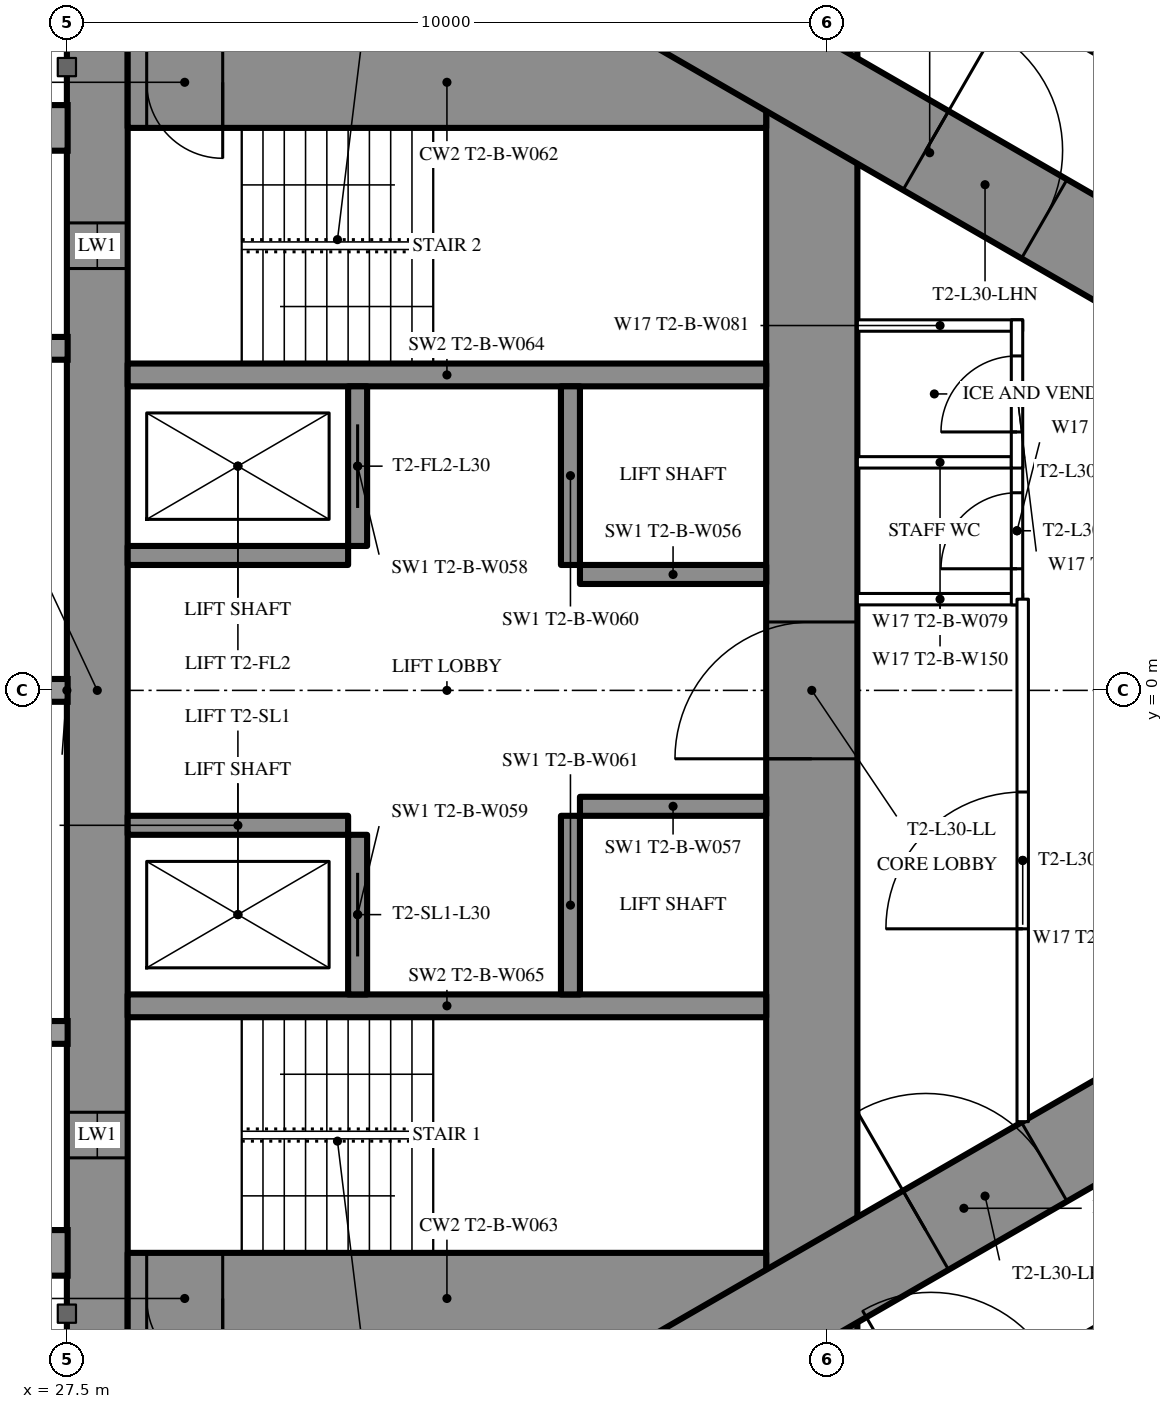
"""IFC4 building model, lengths in metres.
Left out: names, types, materials, properties, quantities, classifications, styles, units other than length and angle.
Written with IfcOpenShell. Run it as: python <this file> out.ifc"""

import sys

from ifc_helpers import new_model, si_unit, direction, frame, frame_2d, origin, place, context, subcontext, project, spatial, rectangle, extrude, element, fill, save


model = new_model("IFC4")
c1 = context("Model", 3, precision=1e-05, world=origin(), true_north=direction((0.0, 1.0)))
c2 = subcontext(c1, "Body", "Model", "MODEL_VIEW")
j1 = project(units=[si_unit("LENGTHUNIT", "METRE"), si_unit("PLANEANGLEUNIT", "RADIAN")], contexts=[c1])
p1 = place(None, origin())
s1 = spatial("IfcSite", under=j1, at=p1, CompositionType="ELEMENT")
p2 = place(p1, origin())
s2 = spatial("IfcBuilding", under=s1, at=p2, CompositionType="ELEMENT")
p3 = place(p2, frame((0.0, 0.0, 115.1)))
s3 = spatial("IfcBuildingStorey", under=s2, at=p3, CompositionType="ELEMENT", Elevation=115.1)
p4 = place(p3, frame((27.9, -8.6, 0.0), z_axis=(0.0, 0.0, 1.0), x_axis=(0.0, 1.0, 0.0)))
e1 = element("IfcWall", 1, at=p4, inside=s3, PredefinedType="SHEAR", context=c2, shape_type="SweptSolid", body=[
    extrude(rectangle(XDim=17.2, YDim=0.8, at=frame_2d((8.6, 0.0))), origin(), (0.0, 0.0, 1.0), 3.5),
])
p5 = place(p4, frame((2.45, 0.0, 0.6)))
e2 = element("IfcOpeningElement", 2, at=p5, cuts=e1, PredefinedType="OPENING", context=c2, shape_type="SweptSolid", body=[
    extrude(rectangle(XDim=0.6, YDim=2.1, at=frame_2d((0.3, 1.05))), frame((0.0, 0.41, 0.0), z_axis=(0.0, -1.0, 0.0), x_axis=(1.0, 0.0, 0.0)), (0.0, 0.0, 1.0), 0.82),
])
p6 = place(p4, frame((14.15, 0.0, 0.6)))
e3 = element("IfcOpeningElement", 3, at=p6, cuts=e1, PredefinedType="OPENING", context=c2, shape_type="SweptSolid", body=[
    extrude(rectangle(XDim=0.6, YDim=2.1, at=frame_2d((0.3, 1.05))), frame((0.0, 0.41, 0.0), z_axis=(0.0, -1.0, 0.0), x_axis=(1.0, 0.0, 0.0)), (0.0, 0.0, 1.0), 0.82),
])
p7 = place(p3, frame((37.3, -8.6, 0.0), z_axis=(0.0, 0.0, 1.0), x_axis=(0.0, 1.0, 0.0)))
e4 = element("IfcWall", 4, at=p7, inside=s3, PredefinedType="SHEAR", context=c2, shape_type="SweptSolid", body=[
    extrude(rectangle(XDim=17.2, YDim=1.2, at=frame_2d((8.6, 0.0))), origin(), (0.0, 0.0, 1.0), 3.5),
])
p8 = place(p7, frame((7.7, 0.0, 0.0)))
e5 = element("IfcOpeningElement", 5, at=p8, cuts=e4, PredefinedType="OPENING", context=c2, shape_type="SweptSolid", body=[
    extrude(rectangle(XDim=1.8, YDim=2.2, at=frame_2d((0.9, 1.1))), frame((0.0, 0.61, 0.0), z_axis=(0.0, -1.0, 0.0), x_axis=(1.0, 0.0, 0.0)), (0.0, 0.0, 1.0), 1.22),
])
p9 = place(p3, frame((28.3, -8.0, 0.0), z_axis=(0.0, 0.0, 1.0), x_axis=(1.0, 0.0, 0.0)))
e6 = element("IfcWall", 6, at=p9, inside=s3, PredefinedType="SHEAR", context=c2, shape_type="SweptSolid", body=[
    extrude(rectangle(XDim=8.4, YDim=1.2, at=frame_2d((4.2, 0.0))), origin(), (0.0, 0.0, 1.0), 3.5),
])
p10 = place(p9, frame((0.25, 0.0, 0.0)))
e7 = element("IfcOpeningElement", 7, at=p10, cuts=e6, PredefinedType="OPENING", context=c2, shape_type="SweptSolid", body=[
    extrude(rectangle(XDim=1.0, YDim=2.2, at=frame_2d((0.5, 1.1))), frame((0.0, 0.61, 0.0), z_axis=(0.0, -1.0, 0.0), x_axis=(1.0, 0.0, 0.0)), (0.0, 0.0, 1.0), 1.22),
])
p11 = place(p3, frame((28.3, 8.0, 0.0), z_axis=(0.0, 0.0, 1.0), x_axis=(1.0, 0.0, 0.0)))
e8 = element("IfcWall", 8, at=p11, inside=s3, PredefinedType="SHEAR", context=c2, shape_type="SweptSolid", body=[
    extrude(rectangle(XDim=8.4, YDim=1.2, at=frame_2d((4.2, 0.0))), origin(), (0.0, 0.0, 1.0), 3.5),
])
p12 = place(p11, frame((0.25, 0.0, 0.0)))
e9 = element("IfcOpeningElement", 9, at=p12, cuts=e8, PredefinedType="OPENING", context=c2, shape_type="SweptSolid", body=[
    extrude(rectangle(XDim=1.0, YDim=2.2, at=frame_2d((0.5, 1.1))), frame((0.0, 0.61, 0.0), z_axis=(0.0, -1.0, 0.0), x_axis=(1.0, 0.0, 0.0)), (0.0, 0.0, 1.0), 1.22),
])
for number, where, z_axis, x_axis in (
    (10, (28.3, -4.15, 0.0), (0.0, 0.0, 1.0), (1.0, 0.0, 0.0)),
    (11, (28.3, 4.15, 0.0), (0.0, 0.0, 1.0), (1.0, 0.0, 0.0)),
):
    element("IfcWall", number, at=place(p3, frame(where, z_axis=z_axis, x_axis=x_axis)), inside=s3, PredefinedType="SHEAR", context=c2, shape_type="SweptSolid", body=[
        extrude(rectangle(XDim=8.4, YDim=0.3, at=frame_2d((4.2, 0.0))), origin(), (0.0, 0.0, 1.0), 3.5),
    ])
p13 = place(p3, frame((31.325, -4.0, 0.0), z_axis=(0.0, 0.0, 1.0), x_axis=(0.0, 1.0, 0.0)))
e12 = element("IfcWall", 12, at=p13, inside=s3, PredefinedType="SHEAR", context=c2, shape_type="SweptSolid", body=[
    extrude(rectangle(XDim=2.1, YDim=0.25, at=frame_2d((1.05, 0.0))), origin(), (0.0, 0.0, 1.0), 3.5),
])
p14 = place(p13, frame((0.5, 0.0, 0.0)))
e13 = element("IfcOpeningElement", 13, at=p14, cuts=e12, PredefinedType="OPENING", context=c2, shape_type="SweptSolid", body=[
    extrude(rectangle(XDim=1.1, YDim=2.2, at=frame_2d((0.55, 1.1))), frame((0.0, 0.135, 0.0), z_axis=(0.0, -1.0, 0.0), x_axis=(1.0, 0.0, 0.0)), (0.0, 0.0, 1.0), 0.27),
])
p15 = place(p3, frame((34.125, -4.0, 0.0), z_axis=(0.0, 0.0, 1.0), x_axis=(0.0, 1.0, 0.0)))
e14 = element("IfcWall", 14, at=p15, inside=s3, PredefinedType="SHEAR", context=c2, shape_type="SweptSolid", body=[
    extrude(rectangle(XDim=2.35, YDim=0.25, at=frame_2d((1.175, 0.0))), origin(), (0.0, 0.0, 1.0), 3.5),
])
p16 = place(p3, frame((28.3, -1.775, 0.0), z_axis=(0.0, 0.0, 1.0), x_axis=(1.0, 0.0, 0.0)))
e15 = element("IfcWall", 15, at=p16, inside=s3, PredefinedType="SHEAR", context=c2, shape_type="SweptSolid", body=[
    extrude(rectangle(XDim=2.9, YDim=0.25, at=frame_2d((1.45, 0.0))), origin(), (0.0, 0.0, 1.0), 3.5),
])
p17 = place(p3, frame((34.25, -1.525, 0.0), z_axis=(0.0, 0.0, 1.0), x_axis=(1.0, 0.0, 0.0)))
e16 = element("IfcWall", 16, at=p17, inside=s3, PredefinedType="SHEAR", context=c2, shape_type="SweptSolid", body=[
    extrude(rectangle(XDim=2.45, YDim=0.25, at=frame_2d((1.225, 0.0))), origin(), (0.0, 0.0, 1.0), 3.5),
])
p18 = place(p3, frame((31.325, 1.9, 0.0), z_axis=(0.0, 0.0, 1.0), x_axis=(0.0, 1.0, 0.0)))
e17 = element("IfcWall", 17, at=p18, inside=s3, PredefinedType="SHEAR", context=c2, shape_type="SweptSolid", body=[
    extrude(rectangle(XDim=2.1, YDim=0.25, at=frame_2d((1.05, 0.0))), origin(), (0.0, 0.0, 1.0), 3.5),
])
p19 = place(p18, frame((0.5, 0.0, 0.0)))
e18 = element("IfcOpeningElement", 18, at=p19, cuts=e17, PredefinedType="OPENING", context=c2, shape_type="SweptSolid", body=[
    extrude(rectangle(XDim=1.1, YDim=2.2, at=frame_2d((0.55, 1.1))), frame((0.0, 0.135, 0.0), z_axis=(0.0, -1.0, 0.0), x_axis=(1.0, 0.0, 0.0)), (0.0, 0.0, 1.0), 0.27),
])
p20 = place(p3, frame((34.125, 1.65, 0.0), z_axis=(0.0, 0.0, 1.0), x_axis=(0.0, 1.0, 0.0)))
e19 = element("IfcWall", 19, at=p20, inside=s3, PredefinedType="SHEAR", context=c2, shape_type="SweptSolid", body=[
    extrude(rectangle(XDim=2.35, YDim=0.25, at=frame_2d((1.175, 0.0))), origin(), (0.0, 0.0, 1.0), 3.5),
])
p21 = place(p3, frame((28.3, 1.775, 0.0), z_axis=(0.0, 0.0, 1.0), x_axis=(1.0, 0.0, 0.0)))
e20 = element("IfcWall", 20, at=p21, inside=s3, PredefinedType="SHEAR", context=c2, shape_type="SweptSolid", body=[
    extrude(rectangle(XDim=2.9, YDim=0.25, at=frame_2d((1.45, 0.0))), origin(), (0.0, 0.0, 1.0), 3.5),
])
p22 = place(p3, frame((34.25, 1.525, 0.0), z_axis=(0.0, 0.0, 1.0), x_axis=(1.0, 0.0, 0.0)))
e21 = element("IfcWall", 21, at=p22, inside=s3, PredefinedType="SHEAR", context=c2, shape_type="SweptSolid", body=[
    extrude(rectangle(XDim=2.45, YDim=0.25, at=frame_2d((1.225, 0.0))), origin(), (0.0, 0.0, 1.0), 3.5),
])
p23 = place(p3, frame((27.2, -13.8, 0.0), z_axis=(0.0, 0.0, 1.0), x_axis=(0.866027159892, 0.499996958321, 0.0)))
e22 = element("IfcWall", 22, at=p23, inside=s3, PredefinedType="SHEAR", context=c2, shape_type="SweptSolid", body=[
    extrude(rectangle(XDim=27.947, YDim=1.2, at=frame_2d((13.973, 0.0))), origin(), (0.0, 0.0, 1.0), 3.5),
])
p24 = place(p23, frame((4.6, 0.0, 0.0)))
e23 = element("IfcOpeningElement", 23, at=p24, cuts=e22, PredefinedType="OPENING", context=c2, shape_type="SweptSolid", body=[
    extrude(rectangle(XDim=1.0, YDim=2.2, at=frame_2d((0.5, 1.1))), frame((0.0, 0.61, 0.0), z_axis=(0.0, -1.0, 0.0), x_axis=(1.0, 0.0, 0.0)), (0.0, 0.0, 1.0), 1.22),
])
p25 = place(p23, frame((13.395, 0.0, 0.0)))
e24 = element("IfcOpeningElement", 24, at=p25, cuts=e22, PredefinedType="OPENING", context=c2, shape_type="SweptSolid", body=[
    extrude(rectangle(XDim=1.8, YDim=2.2, at=frame_2d((0.9, 1.1))), frame((0.0, 0.61, 0.0), z_axis=(0.0, -1.0, 0.0), x_axis=(1.0, 0.0, 0.0)), (0.0, 0.0, 1.0), 1.22),
])
p26 = place(p3, frame((27.2, 13.8, 0.0), z_axis=(0.0, 0.0, 1.0), x_axis=(0.866024515034, -0.500001539357, 0.0)))
e25 = element("IfcWall", 25, at=p26, inside=s3, PredefinedType="SHEAR", context=c2, shape_type="SweptSolid", body=[
    extrude(rectangle(XDim=26.907, YDim=1.2, at=frame_2d((13.454, 0.0))), origin(), (0.0, 0.0, 1.0), 3.5),
])
p27 = place(p26, frame((4.6, 0.0, 0.0)))
e26 = element("IfcOpeningElement", 26, at=p27, cuts=e25, PredefinedType="OPENING", context=c2, shape_type="SweptSolid", body=[
    extrude(rectangle(XDim=1.0, YDim=2.2, at=frame_2d((0.5, 1.1))), frame((0.0, 0.61, 0.0), z_axis=(0.0, -1.0, 0.0), x_axis=(1.0, 0.0, 0.0)), (0.0, 0.0, 1.0), 1.22),
])
p28 = place(p26, frame((13.395, 0.0, 0.0)))
e27 = element("IfcOpeningElement", 27, at=p28, cuts=e25, PredefinedType="OPENING", context=c2, shape_type="SweptSolid", body=[
    extrude(rectangle(XDim=1.8, YDim=2.2, at=frame_2d((0.9, 1.1))), frame((0.0, 0.61, 0.0), z_axis=(0.0, -1.0, 0.0), x_axis=(1.0, 0.0, 0.0)), (0.0, 0.0, 1.0), 1.22),
])
p29 = place(p3, frame((37.96, -10.243, 0.0), z_axis=(0.0, 0.0, 1.0), x_axis=(0.866026429433, 0.499998223521, 0.0)))
e28 = element("IfcWall", 28, at=p29, inside=s3, PredefinedType="PARTITIONING", context=c2, shape_type="SweptSolid", body=[
    extrude(rectangle(XDim=20.487, YDim=0.2, at=frame_2d((10.243, 0.0))), origin(), (0.0, 0.0, 1.0), 3.25),
])
p30 = place(p29, frame((4.343, 0.0, 0.0)))
e29 = element("IfcOpeningElement", 29, at=p30, cuts=e28, PredefinedType="OPENING", context=c2, shape_type="SweptSolid", body=[
    extrude(rectangle(XDim=0.95, YDim=2.2, at=frame_2d((0.475, 1.1))), frame((0.0, 0.11, 0.0), z_axis=(0.0, -1.0, 0.0), x_axis=(1.0, 0.0, 0.0)), (0.0, 0.0, 1.0), 0.22),
])
p31 = place(p29, frame((15.385, 0.0, 0.0)))
e30 = element("IfcOpeningElement", 30, at=p31, cuts=e28, PredefinedType="OPENING", context=c2, shape_type="SweptSolid", body=[
    extrude(rectangle(XDim=0.95, YDim=2.2, at=frame_2d((0.475, 1.1))), frame((0.0, 0.11, 0.0), z_axis=(0.0, -1.0, 0.0), x_axis=(1.0, 0.0, 0.0)), (0.0, 0.0, 1.0), 0.22),
])
p32 = place(p29, frame((17.085, 0.0, 0.0)))
e31 = element("IfcOpeningElement", 31, at=p32, cuts=e28, PredefinedType="OPENING", context=c2, shape_type="SweptSolid", body=[
    extrude(rectangle(XDim=0.95, YDim=2.2, at=frame_2d((0.475, 1.1))), frame((0.0, 0.11, 0.0), z_axis=(0.0, -1.0, 0.0), x_axis=(1.0, 0.0, 0.0)), (0.0, 0.0, 1.0), 0.22),
])
p33 = place(p29, frame((1.048, 0.0, 0.0)))
e32 = element("IfcOpeningElement", 32, at=p33, cuts=e28, PredefinedType="OPENING", context=c2, shape_type="SweptSolid", body=[
    extrude(rectangle(XDim=1.8, YDim=2.2, at=frame_2d((0.9, 1.1))), frame((0.0, 0.11, 0.0), z_axis=(0.0, -1.0, 0.0), x_axis=(1.0, 0.0, 0.0)), (0.0, 0.0, 1.0), 0.22),
])
p34 = place(p3, frame((36.834, 10.894, 0.0), z_axis=(0.0, 0.0, 1.0), x_axis=(0.866032723471, -0.499987321717, 0.0)))
e33 = element("IfcWall", 33, at=p34, inside=s3, PredefinedType="PARTITIONING", context=c2, shape_type="SweptSolid", body=[
    extrude(rectangle(XDim=4.947, YDim=0.2, at=frame_2d((2.474, 0.0))), origin(), (0.0, 0.0, 1.0), 3.25),
])
p35 = place(p34, frame((1.006, 0.0, 0.0)))
e34 = element("IfcOpeningElement", 34, at=p35, cuts=e33, PredefinedType="OPENING", context=c2, shape_type="SweptSolid", body=[
    extrude(rectangle(XDim=0.95, YDim=2.2, at=frame_2d((0.475, 1.1))), frame((0.0, 0.11, 0.0), z_axis=(0.0, -1.0, 0.0), x_axis=(1.0, 0.0, 0.0)), (0.0, 0.0, 1.0), 0.22),
])
for number, where, z_axis, x_axis in (
    (35, (37.9, 1.2, 0.0), (0.0, 0.0, 1.0), (1.0, 0.0, 0.0)),
    (36, (37.9, 3.0, 0.0), (0.0, 0.0, 1.0), (1.0, 0.0, 0.0)),
    (37, (37.9, 4.8, 0.0), (0.0, 0.0, 1.0), (1.0, 0.0, 0.0)),
):
    element("IfcWall", number, at=place(p3, frame(where, z_axis=z_axis, x_axis=x_axis)), inside=s3, PredefinedType="PARTITIONING", context=c2, shape_type="SweptSolid", body=[
        extrude(rectangle(XDim=2.175, YDim=0.15, at=frame_2d((1.087, 0.0))), origin(), (0.0, 0.0, 1.0), 3.25),
    ])
p36 = place(p3, frame((40.0, 1.125, 0.0), z_axis=(0.0, 0.0, 1.0), x_axis=(0.0, 1.0, 0.0)))
e38 = element("IfcWall", 38, at=p36, inside=s3, PredefinedType="PARTITIONING", context=c2, shape_type="SweptSolid", body=[
    extrude(rectangle(XDim=1.95, YDim=0.15, at=frame_2d((0.975, 0.0))), origin(), (0.0, 0.0, 1.0), 3.25),
])
p37 = place(p36, frame((0.475, 0.0, 0.0)))
e39 = element("IfcOpeningElement", 39, at=p37, cuts=e38, PredefinedType="OPENING", context=c2, shape_type="SweptSolid", body=[
    extrude(rectangle(XDim=1.0, YDim=2.2, at=frame_2d((0.5, 1.1))), frame((0.0, 0.085, 0.0), z_axis=(0.0, -1.0, 0.0), x_axis=(1.0, 0.0, 0.0)), (0.0, 0.0, 1.0), 0.17),
])
p38 = place(p3, frame((40.0, 2.925, 0.0), z_axis=(0.0, 0.0, 1.0), x_axis=(0.0, 1.0, 0.0)))
e40 = element("IfcWall", 40, at=p38, inside=s3, PredefinedType="PARTITIONING", context=c2, shape_type="SweptSolid", body=[
    extrude(rectangle(XDim=1.95, YDim=0.15, at=frame_2d((0.975, 0.0))), origin(), (0.0, 0.0, 1.0), 3.25),
])
p39 = place(p38, frame((0.475, 0.0, 0.0)))
e41 = element("IfcOpeningElement", 41, at=p39, cuts=e40, PredefinedType="OPENING", context=c2, shape_type="SweptSolid", body=[
    extrude(rectangle(XDim=1.0, YDim=2.2, at=frame_2d((0.5, 1.1))), frame((0.0, 0.085, 0.0), z_axis=(0.0, -1.0, 0.0), x_axis=(1.0, 0.0, 0.0)), (0.0, 0.0, 1.0), 0.17),
])
p40 = place(p3, frame((40.075, -5.674, 0.0), z_axis=(0.0, 0.0, 1.0), x_axis=(0.0, 1.0, 0.0)))
e42 = element("IfcWall", 42, at=p40, inside=s3, PredefinedType="PARTITIONING", context=c2, shape_type="SweptSolid", body=[
    extrude(rectangle(XDim=6.874, YDim=0.15, at=frame_2d((3.437, 0.0))), origin(), (0.0, 0.0, 1.0), 3.25),
])
p41 = place(p40, frame((2.537, 0.0, 0.0)))
e43 = element("IfcOpeningElement", 43, at=p41, cuts=e42, PredefinedType="OPENING", context=c2, shape_type="SweptSolid", body=[
    extrude(rectangle(XDim=1.8, YDim=2.2, at=frame_2d((0.9, 1.1))), frame((0.0, 0.085, 0.0), z_axis=(0.0, -1.0, 0.0), x_axis=(1.0, 0.0, 0.0)), (0.0, 0.0, 1.0), 0.17),
])
p42 = place(p37, origin())
e44 = element("IfcDoor", 44, at=p42, inside=s3, OperationType="SINGLE_SWING_LEFT", PredefinedType="DOOR", context=c2, shape_type="SweptSolid", body=[
    extrude(rectangle(XDim=1.0, YDim=2.2, at=frame_2d((0.5, 1.1))), frame((0.0, 0.025, 0.0), z_axis=(0.0, -1.0, 0.0), x_axis=(1.0, 0.0, 0.0)), (0.0, 0.0, 1.0), 0.05),
])
fill(e39, e44)
p43 = place(p39, origin())
e45 = element("IfcDoor", 45, at=p43, inside=s3, OperationType="SINGLE_SWING_LEFT", PredefinedType="DOOR", context=c2, shape_type="SweptSolid", body=[
    extrude(rectangle(XDim=1.0, YDim=2.2, at=frame_2d((0.5, 1.1))), frame((0.0, 0.025, 0.0), z_axis=(0.0, -1.0, 0.0), x_axis=(1.0, 0.0, 0.0)), (0.0, 0.0, 1.0), 0.05),
])
fill(e41, e45)
p44 = place(p41, origin())
e46 = element("IfcDoor", 46, at=p44, inside=s3, OperationType="DOUBLE_DOOR_SINGLE_SWING", PredefinedType="DOOR", context=c2, shape_type="SweptSolid", body=[
    extrude(rectangle(XDim=1.8, YDim=2.2, at=frame_2d((0.9, 1.1))), frame((0.0, 0.025, 0.0), z_axis=(0.0, -1.0, 0.0), x_axis=(1.0, 0.0, 0.0)), (0.0, 0.0, 1.0), 0.05),
])
fill(e43, e46)
p45 = place(p25, origin())
e47 = element("IfcDoor", 47, at=p45, inside=s3, OperationType="DOUBLE_DOOR_SINGLE_SWING", PredefinedType="DOOR", context=c2, shape_type="SweptSolid", body=[
    extrude(rectangle(XDim=1.8, YDim=2.2, at=frame_2d((0.9, 1.1))), frame((0.0, 0.025, 0.0), z_axis=(0.0, -1.0, 0.0), x_axis=(1.0, 0.0, 0.0)), (0.0, 0.0, 1.0), 0.05),
])
fill(e24, e47)
p46 = place(p28, origin())
e48 = element("IfcDoor", 48, at=p46, inside=s3, OperationType="DOUBLE_DOOR_SINGLE_SWING", PredefinedType="DOOR", context=c2, shape_type="SweptSolid", body=[
    extrude(rectangle(XDim=1.8, YDim=2.2, at=frame_2d((0.9, 1.1))), frame((0.0, 0.025, 0.0), z_axis=(0.0, -1.0, 0.0), x_axis=(1.0, 0.0, 0.0)), (0.0, 0.0, 1.0), 0.05),
])
fill(e27, e48)
p47 = place(p8, origin())
e49 = element("IfcDoor", 49, at=p47, inside=s3, OperationType="DOUBLE_DOOR_SINGLE_SWING", PredefinedType="DOOR", context=c2, shape_type="SweptSolid", body=[
    extrude(rectangle(XDim=1.8, YDim=2.2, at=frame_2d((0.9, 1.1))), frame((0.0, 0.025, 0.0), z_axis=(0.0, -1.0, 0.0), x_axis=(1.0, 0.0, 0.0)), (0.0, 0.0, 1.0), 0.05),
])
fill(e5, e49)
p48 = place(p10, origin())
e50 = element("IfcDoor", 50, at=p48, inside=s3, OperationType="SINGLE_SWING_RIGHT", PredefinedType="DOOR", context=c2, shape_type="SweptSolid", body=[
    extrude(rectangle(XDim=1.0, YDim=2.2, at=frame_2d((0.5, 1.1))), frame((0.0, 0.025, 0.0), z_axis=(0.0, -1.0, 0.0), x_axis=(1.0, 0.0, 0.0)), (0.0, 0.0, 1.0), 0.05),
])
fill(e7, e50)
p49 = place(p12, origin())
e51 = element("IfcDoor", 51, at=p49, inside=s3, OperationType="SINGLE_SWING_RIGHT", PredefinedType="DOOR", context=c2, shape_type="SweptSolid", body=[
    extrude(rectangle(XDim=1.0, YDim=2.2, at=frame_2d((0.5, 1.1))), frame((0.0, 0.025, 0.0), z_axis=(0.0, -1.0, 0.0), x_axis=(1.0, 0.0, 0.0)), (0.0, 0.0, 1.0), 0.05),
])
fill(e9, e51)
p50 = place(p14, origin())
e52 = element("IfcDoor", 52, at=p50, inside=s3, OperationType="SLIDING_TO_LEFT", PredefinedType="USERDEFINED", context=c2, shape_type="SweptSolid", body=[
    extrude(rectangle(XDim=1.1, YDim=2.2, at=frame_2d((0.55, 1.1))), frame((0.0, 0.025, 0.0), z_axis=(0.0, -1.0, 0.0), x_axis=(1.0, 0.0, 0.0)), (0.0, 0.0, 1.0), 0.05),
])
fill(e13, e52)
p51 = place(p19, origin())
e53 = element("IfcDoor", 53, at=p51, inside=s3, OperationType="SLIDING_TO_LEFT", PredefinedType="USERDEFINED", context=c2, shape_type="SweptSolid", body=[
    extrude(rectangle(XDim=1.1, YDim=2.2, at=frame_2d((0.55, 1.1))), frame((0.0, 0.025, 0.0), z_axis=(0.0, -1.0, 0.0), x_axis=(1.0, 0.0, 0.0)), (0.0, 0.0, 1.0), 0.05),
])
fill(e18, e53)
p52 = place(p5, origin())
e54 = element("IfcWindow", 54, at=p52, inside=s3, PartitioningType="SINGLE_PANEL", PredefinedType="WINDOW", context=c2, shape_type="SweptSolid", body=[
    extrude(rectangle(XDim=0.6, YDim=2.1, at=frame_2d((0.3, 1.05))), frame((0.0, 0.03, 0.0), z_axis=(0.0, -1.0, 0.0), x_axis=(1.0, 0.0, 0.0)), (0.0, 0.0, 1.0), 0.06),
])
fill(e2, e54)
p53 = place(p6, origin())
e55 = element("IfcWindow", 55, at=p53, inside=s3, PartitioningType="SINGLE_PANEL", PredefinedType="WINDOW", context=c2, shape_type="SweptSolid", body=[
    extrude(rectangle(XDim=0.6, YDim=2.1, at=frame_2d((0.3, 1.05))), frame((0.0, 0.03, 0.0), z_axis=(0.0, -1.0, 0.0), x_axis=(1.0, 0.0, 0.0)), (0.0, 0.0, 1.0), 0.06),
])
fill(e3, e55)
save(model, sys.argv[1])
